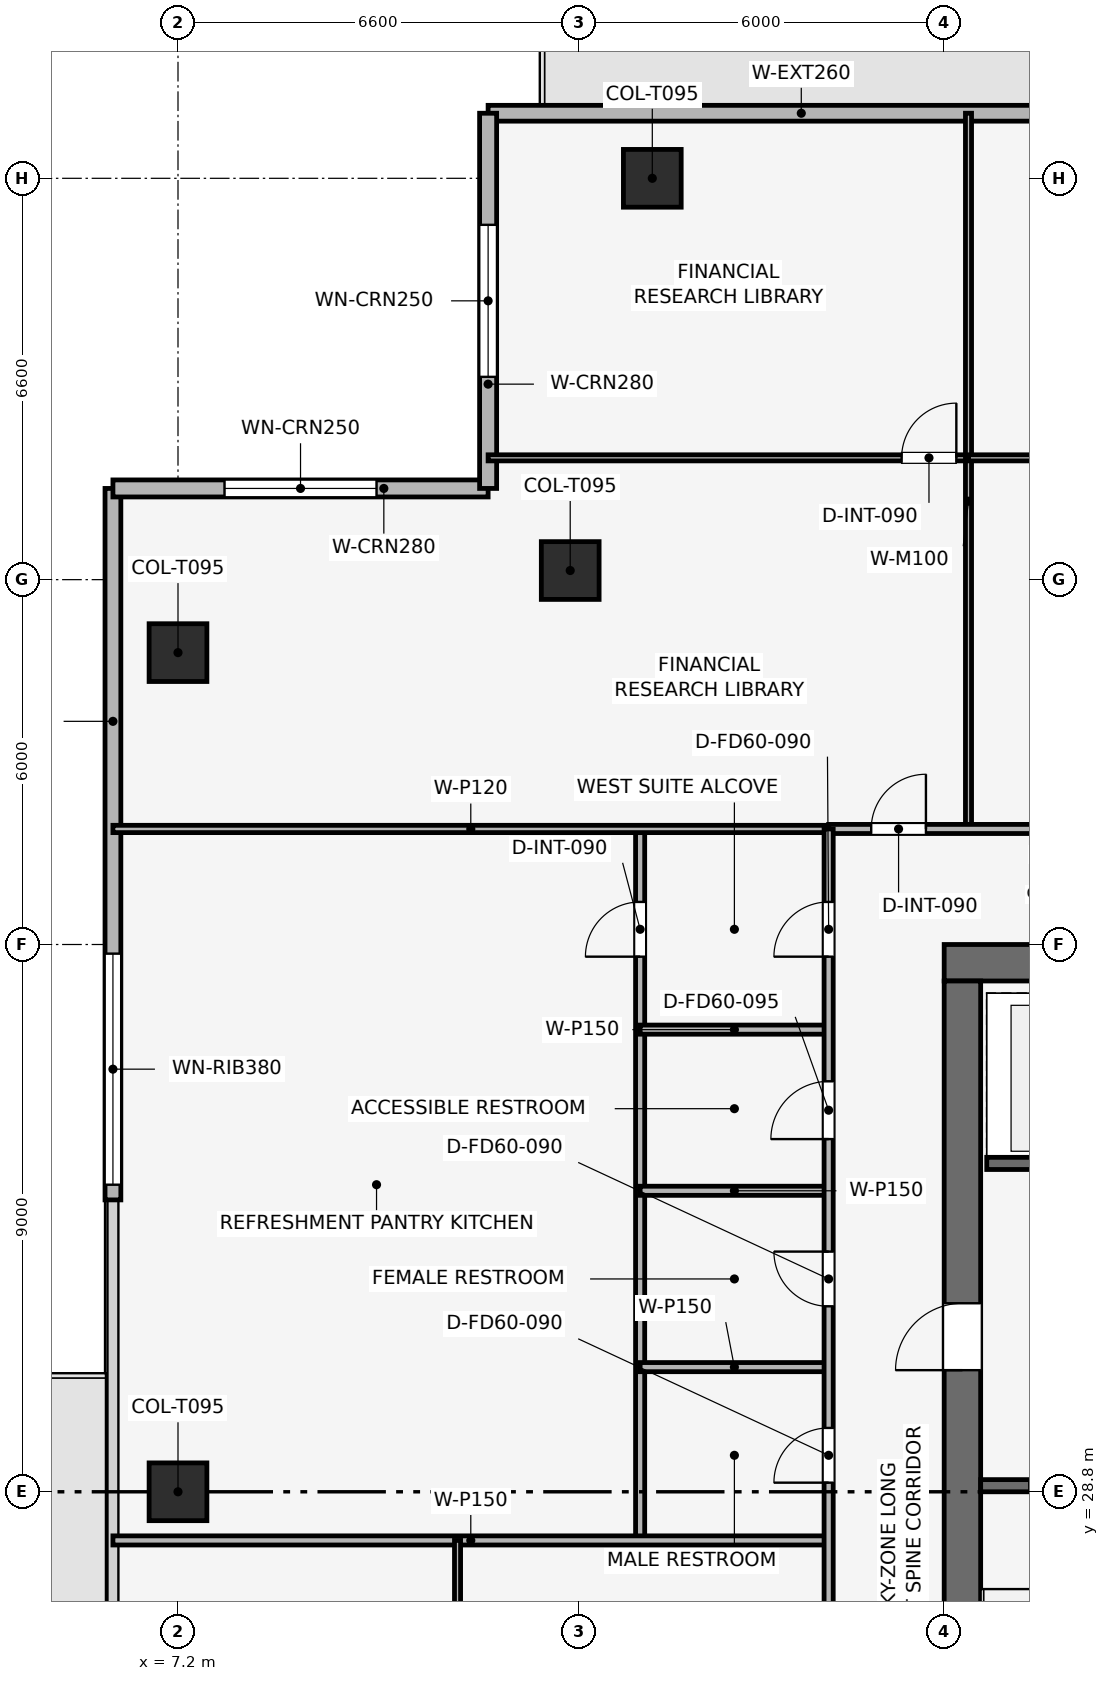
"""IFC4 building model, lengths in metres.
Left out: names, types, materials, properties, quantities, classifications, styles, units other than length and angle.
Written with IfcOpenShell. Run it as: python <this file> out.ifc"""

import sys

from ifc_helpers import new_model, si_unit, direction, frame, frame_2d, origin, origin_2d, place, context, subcontext, project, spatial, rectangle, extrude, element, fill, save


model = new_model("IFC4")
c1 = context("Model", 3, precision=1e-05, world=origin(), true_north=direction((0.0, 1.0)))
c2 = subcontext(c1, "Body", "Model", "MODEL_VIEW")
j1 = project(units=[si_unit("LENGTHUNIT", "METRE"), si_unit("PLANEANGLEUNIT", "RADIAN")], contexts=[c1])
p1 = place(None, origin())
s1 = spatial("IfcSite", under=j1, at=p1, CompositionType="ELEMENT")
p2 = place(p1, origin())
s2 = spatial("IfcBuilding", under=s1, at=p2, CompositionType="ELEMENT")
p3 = place(p2, frame((0.0, 0.0, 299.25)))
s3 = spatial("IfcBuildingStorey", under=s2, at=p3, CompositionType="ELEMENT", Elevation=299.25)
p4 = place(p3, frame((19.8, 37.5, 0.0), z_axis=(0.0, 0.0, 1.0), x_axis=(1.0, 0.0, 0.0)))
e1 = element("IfcWall", 1, at=p4, inside=s3, PredefinedType="SHEAR", context=c2, shape_type="SweptSolid", body=[
    extrude(rectangle(XDim=18.0, YDim=0.6, at=frame_2d((9.0, 0.0))), origin(), (0.0, 0.0, 1.0), 3.75),
])
p5 = place(p4, frame((7.05, 0.0, 0.0)))
e2 = element("IfcOpeningElement", 2, at=p5, cuts=e1, PredefinedType="OPENING", context=c2, shape_type="SweptSolid", body=[
    extrude(rectangle(XDim=1.1, YDim=2.15, at=frame_2d((0.55, 1.075))), frame((0.0, 0.31, 0.0), z_axis=(0.0, -1.0, 0.0), x_axis=(1.0, 0.0, 0.0)), (0.0, 0.0, 1.0), 0.62),
])
p6 = place(p3, frame((20.1, 20.4, 0.0), z_axis=(0.0, 0.0, 1.0), x_axis=(0.0, 1.0, 0.0)))
e3 = element("IfcWall", 3, at=p6, inside=s3, PredefinedType="SHEAR", context=c2, shape_type="SweptSolid", body=[
    extrude(rectangle(XDim=16.8, YDim=0.6, at=frame_2d((8.4, 0.0))), origin(), (0.0, 0.0, 1.0), 3.75),
])
p7 = place(p6, frame((10.4, 0.0, 0.0)))
e4 = element("IfcOpeningElement", 4, at=p7, cuts=e3, PredefinedType="OPENING", context=c2, shape_type="SweptSolid", body=[
    extrude(rectangle(XDim=1.1, YDim=2.15, at=frame_2d((0.55, 1.075))), frame((0.0, 0.31, 0.0), z_axis=(0.0, -1.0, 0.0), x_axis=(1.0, 0.0, 0.0)), (0.0, 0.0, 1.0), 0.62),
])
for number, where, z_axis, x_axis in (
    (5, (15.0, 50.4, 0.003), (0.0, 0.0, 1.0), (1.0, 0.0, 0.0)),
    (6, (7.2, 42.6, 0.003), (0.0, 0.0, 1.0), (1.0, 0.0, 0.0)),
    (7, (7.2, 28.8, 0.003), (0.0, 0.0, 1.0), (1.0, 0.0, 0.0)),
    (8, (13.65, 43.95, 0.003), (0.0, 0.0, 1.0), (1.0, 0.0, 0.0)),
):
    element("IfcColumn", number, at=place(p3, frame(where, z_axis=z_axis, x_axis=x_axis)), inside=s3, PredefinedType="COLUMN", context=c2, shape_type="SweptSolid", body=[
        extrude(rectangle(XDim=0.95, YDim=0.95, at=origin_2d()), origin(), (0.0, 0.0, 1.0), 3.504),
    ])
p8 = place(p3, frame((12.3, 51.47, 0.0), z_axis=(0.0, 0.0, 1.0), x_axis=(1.0, 0.0, 0.0)))
e9 = element("IfcWall", 9, at=p8, inside=s3, PredefinedType="SOLIDWALL", context=c2, shape_type="SweptSolid", body=[
    extrude(rectangle(XDim=11.7, YDim=0.26, at=frame_2d((5.85, 0.0))), origin(), (0.0, 0.0, 1.0), 3.51),
])
p9 = place(p8, frame((10.45, 0.0, 0.0)))
e10 = element("IfcOpeningElement", 10, at=p9, cuts=e9, PredefinedType="OPENING", context=c2, shape_type="SweptSolid", body=[
    extrude(rectangle(XDim=1.0, YDim=2.2, at=frame_2d((0.5, 1.1))), frame((0.0, 0.14, 0.0), z_axis=(0.0, -1.0, 0.0), x_axis=(1.0, 0.0, 0.0)), (0.0, 0.0, 1.0), 0.28),
])
p10 = place(p3, frame((6.13, 33.6, 0.0), z_axis=(0.0, 0.0, 1.0), x_axis=(0.0, 1.0, 0.0)))
e11 = element("IfcWall", 11, at=p10, inside=s3, PredefinedType="SOLIDWALL", context=c2, shape_type="SweptSolid", body=[
    extrude(rectangle(XDim=11.7, YDim=0.26, at=frame_2d((5.85, 0.0))), origin(), (0.0, 0.0, 1.0), 3.51),
])
p11 = place(p10, frame((0.25, 0.0, 0.9)))
e12 = element("IfcOpeningElement", 12, at=p11, cuts=e11, PredefinedType="OPENING", context=c2, shape_type="SweptSolid", body=[
    extrude(rectangle(XDim=3.8, YDim=1.9, at=frame_2d((1.9, 0.95))), frame((0.0, 0.14, 0.0), z_axis=(0.0, -1.0, 0.0), x_axis=(1.0, 0.0, 0.0)), (0.0, 0.0, 1.0), 0.28),
])
p12 = place(p3, frame((6.13, 45.3, 0.0), z_axis=(0.0, 0.0, 1.0), x_axis=(1.0, 0.0, 0.0)))
e13 = element("IfcWall", 13, at=p12, inside=s3, PredefinedType="SOLIDWALL", context=c2, shape_type="SweptSolid", body=[
    extrude(rectangle(XDim=6.17, YDim=0.28, at=frame_2d((3.085, 0.0))), origin(), (0.0, 0.0, 1.0), 3.51),
])
p13 = place(p12, frame((1.835, 0.0, 0.9)))
e14 = element("IfcOpeningElement", 14, at=p13, cuts=e13, PredefinedType="OPENING", context=c2, shape_type="SweptSolid", body=[
    extrude(rectangle(XDim=2.5, YDim=1.9, at=frame_2d((1.25, 0.95))), frame((0.0, 0.15, 0.0), z_axis=(0.0, -1.0, 0.0), x_axis=(1.0, 0.0, 0.0)), (0.0, 0.0, 1.0), 0.3),
])
p14 = place(p3, frame((12.3, 45.3, 0.0), z_axis=(0.0, 0.0, 1.0), x_axis=(0.0, 1.0, 0.0)))
e15 = element("IfcWall", 15, at=p14, inside=s3, PredefinedType="SOLIDWALL", context=c2, shape_type="SweptSolid", body=[
    extrude(rectangle(XDim=6.17, YDim=0.28, at=frame_2d((3.085, 0.0))), origin(), (0.0, 0.0, 1.0), 3.51),
])
p15 = place(p14, frame((1.835, 0.0, 0.9)))
e16 = element("IfcOpeningElement", 16, at=p15, cuts=e15, PredefinedType="OPENING", context=c2, shape_type="SweptSolid", body=[
    extrude(rectangle(XDim=2.5, YDim=1.9, at=frame_2d((1.25, 0.95))), frame((0.0, 0.15, 0.0), z_axis=(0.0, -1.0, 0.0), x_axis=(1.0, 0.0, 0.0)), (0.0, 0.0, 1.0), 0.3),
])
p16 = place(p3, frame((20.4, 28.9, 0.0), z_axis=(0.0, 0.0, 1.0), x_axis=(1.0, 0.0, 0.0)))
e17 = element("IfcWall", 17, at=p16, inside=s3, PredefinedType="SHEAR", context=c2, shape_type="SweptSolid", body=[
    extrude(rectangle(XDim=3.15, YDim=0.2, at=frame_2d((1.575, 0.0))), origin(), (0.0, 0.0, 1.0), 3.51),
])
p17 = place(p16, frame((0.8, 0.0, 0.0)))
e18 = element("IfcOpeningElement", 18, at=p17, cuts=e17, PredefinedType="OPENING", context=c2, shape_type="SweptSolid", body=[
    extrude(rectangle(XDim=1.0, YDim=2.1, at=frame_2d((0.5, 1.05))), frame((0.0, 0.11, 0.0), z_axis=(0.0, -1.0, 0.0), x_axis=(1.0, 0.0, 0.0)), (0.0, 0.0, 1.0), 0.22),
])
p18 = place(p3, frame((20.5, 34.2, 0.0), z_axis=(0.0, 0.0, 1.0), x_axis=(1.0, 0.0, 0.0)))
e19 = element("IfcWall", 19, at=p18, inside=s3, PredefinedType="SHEAR", context=c2, shape_type="SweptSolid", body=[
    extrude(rectangle(XDim=3.05, YDim=0.2, at=frame_2d((1.525, 0.0))), origin(), (0.0, 0.0, 1.0), 3.51),
])
p19 = place(p18, frame((0.75, 0.0, 0.0)))
e20 = element("IfcOpeningElement", 20, at=p19, cuts=e19, PredefinedType="OPENING", context=c2, shape_type="SweptSolid", body=[
    extrude(rectangle(XDim=1.1, YDim=2.15, at=frame_2d((0.55, 1.075))), frame((0.0, 0.11, 0.0), z_axis=(0.0, -1.0, 0.0), x_axis=(1.0, 0.0, 0.0)), (0.0, 0.0, 1.0), 0.22),
])
p20 = place(p3, frame((12.3, 45.803, 0.0), z_axis=(0.0, 0.0, 1.0), x_axis=(1.0, 0.0, 0.0)))
e21 = element("IfcWall", 21, at=p20, inside=s3, PredefinedType="MOVABLE", context=c2, shape_type="SweptSolid", body=[
    extrude(rectangle(XDim=7.9, YDim=0.1, at=frame_2d((3.95, 0.0))), origin(), (0.0, 0.0, 1.0), 3.095),
])
p21 = place(p20, frame((6.8, 0.0, 0.0)))
e22 = element("IfcOpeningElement", 22, at=p21, cuts=e21, PredefinedType="OPENING", context=c2, shape_type="SweptSolid", body=[
    extrude(rectangle(XDim=0.9, YDim=2.1, at=frame_2d((0.45, 1.05))), frame((0.0, 0.06, 0.0), z_axis=(0.0, -1.0, 0.0), x_axis=(1.0, 0.0, 0.0)), (0.0, 0.0, 1.0), 0.12),
])
p22 = place(p3, frame((20.2, 39.7, 0.0), z_axis=(0.0, 0.0, 1.0), x_axis=(0.0, 1.0, 0.0)))
e23 = element("IfcWall", 23, at=p22, inside=s3, PredefinedType="MOVABLE", context=c2, shape_type="SweptSolid", body=[
    extrude(rectangle(XDim=11.77, YDim=0.1, at=frame_2d((5.885, 0.0))), origin(), (0.0, 0.0, 1.0), 3.095),
])
p23 = place(p3, frame((20.2, 45.803, 0.0), z_axis=(0.0, 0.0, 1.0), x_axis=(1.0, 0.0, 0.0)))
e24 = element("IfcWall", 24, at=p23, inside=s3, PredefinedType="MOVABLE", context=c2, shape_type="SweptSolid", body=[
    extrude(rectangle(XDim=8.405, YDim=0.1, at=frame_2d((4.203, 0.0))), origin(), (0.0, 0.0, 1.0), 3.095),
])
p24 = place(p23, frame((1.384, 0.0, 0.0)))
e25 = element("IfcOpeningElement", 25, at=p24, cuts=e24, PredefinedType="OPENING", context=c2, shape_type="SweptSolid", body=[
    extrude(rectangle(XDim=0.9, YDim=2.1, at=frame_2d((0.45, 1.05))), frame((0.0, 0.06, 0.0), z_axis=(0.0, -1.0, 0.0), x_axis=(1.0, 0.0, 0.0)), (0.0, 0.0, 1.0), 0.12),
])
p25 = place(p3, frame((14.8, 28.0, 0.0), z_axis=(0.0, 0.0, 1.0), x_axis=(0.0, 1.0, 0.0)))
e26 = element("IfcWall", 26, at=p25, inside=s3, PredefinedType="PARTITIONING", context=c2, shape_type="SweptSolid", body=[
    extrude(rectangle(XDim=11.7, YDim=0.15, at=frame_2d((5.85, 0.0))), origin(), (0.0, 0.0, 1.0), 3.095),
])
p26 = place(p25, frame((9.6, 0.0, 0.0)))
e27 = element("IfcOpeningElement", 27, at=p26, cuts=e26, PredefinedType="OPENING", context=c2, shape_type="SweptSolid", body=[
    extrude(rectangle(XDim=0.9, YDim=2.1, at=frame_2d((0.45, 1.05))), frame((0.0, 0.085, 0.0), z_axis=(0.0, -1.0, 0.0), x_axis=(1.0, 0.0, 0.0)), (0.0, 0.0, 1.0), 0.17),
])
p27 = place(p3, frame((6.13, 28.0, 0.0), z_axis=(0.0, 0.0, 1.0), x_axis=(1.0, 0.0, 0.0)))
e28 = element("IfcWall", 28, at=p27, inside=s3, PredefinedType="PARTITIONING", context=c2, shape_type="SweptSolid", body=[
    extrude(rectangle(XDim=11.77, YDim=0.15, at=frame_2d((5.885, 0.0))), origin(), (0.0, 0.0, 1.0), 3.135),
])
for number, where, z_axis, x_axis in (
    (29, (14.8, 36.4, 0.0), (0.0, 0.0, 1.0), (1.0, 0.0, 0.0)),
    (30, (14.8, 30.85, 0.0), (0.0, 0.0, 1.0), (1.0, 0.0, 0.0)),
    (31, (14.8, 33.75, 0.0), (0.0, 0.0, 1.0), (1.0, 0.0, 0.0)),
):
    element("IfcWall", number, at=place(p3, frame(where, z_axis=z_axis, x_axis=x_axis)), inside=s3, PredefinedType="PARTITIONING", context=c2, shape_type="SweptSolid", body=[
        extrude(rectangle(XDim=3.1, YDim=0.15, at=frame_2d((1.55, 0.0))), origin(), (0.0, 0.0, 1.0), 3.135),
    ])
p28 = place(p3, frame((11.797, 17.93, 0.0), z_axis=(0.0, 0.0, 1.0), x_axis=(0.0, 1.0, 0.0)))
e32 = element("IfcWall", 32, at=p28, inside=s3, PredefinedType="MOVABLE", context=c2, shape_type="SweptSolid", body=[
    extrude(rectangle(XDim=10.07, YDim=0.1, at=frame_2d((5.035, 0.0))), origin(), (0.0, 0.0, 1.0), 3.095),
])
p29 = place(p28, frame((3.489, 0.0, 0.0)))
e33 = element("IfcOpeningElement", 33, at=p29, cuts=e32, PredefinedType="OPENING", context=c2, shape_type="SweptSolid", body=[
    extrude(rectangle(XDim=0.9, YDim=2.1, at=frame_2d((0.45, 1.05))), frame((0.0, 0.06, 0.0), z_axis=(0.0, -1.0, 0.0), x_axis=(1.0, 0.0, 0.0)), (0.0, 0.0, 1.0), 0.12),
])
p30 = place(p3, frame((6.13, 39.7, 0.0), z_axis=(0.0, 0.0, 1.0), x_axis=(1.0, 0.0, 0.0)))
e34 = element("IfcWall", 34, at=p30, inside=s3, PredefinedType="PARTITIONING", context=c2, shape_type="SweptSolid", body=[
    extrude(rectangle(XDim=11.77, YDim=0.12, at=frame_2d((5.885, 0.0))), origin(), (0.0, 0.0, 1.0), 3.095),
])
p31 = place(p3, frame((17.9, 39.7, 0.0), z_axis=(0.0, 0.0, 1.0), x_axis=(1.0, 0.0, 0.0)))
e35 = element("IfcWall", 35, at=p31, inside=s3, PredefinedType="PARTITIONING", context=c2, shape_type="SweptSolid", body=[
    extrude(rectangle(XDim=21.8, YDim=0.15, at=frame_2d((10.9, 0.0))), origin(), (0.0, 0.0, 1.0), 3.095),
])
p32 = place(p31, frame((0.7, 0.0, 0.0)))
e36 = element("IfcOpeningElement", 36, at=p32, cuts=e35, PredefinedType="OPENING", context=c2, shape_type="SweptSolid", body=[
    extrude(rectangle(XDim=0.9, YDim=2.1, at=frame_2d((0.45, 1.05))), frame((0.0, 0.085, 0.0), z_axis=(0.0, -1.0, 0.0), x_axis=(1.0, 0.0, 0.0)), (0.0, 0.0, 1.0), 0.17),
])
p33 = place(p31, frame((6.053, 0.0, 0.0)))
e37 = element("IfcOpeningElement", 37, at=p33, cuts=e35, PredefinedType="OPENING", context=c2, shape_type="SweptSolid", body=[
    extrude(rectangle(XDim=0.9, YDim=2.1, at=frame_2d((0.45, 1.05))), frame((0.0, 0.085, 0.0), z_axis=(0.0, -1.0, 0.0), x_axis=(1.0, 0.0, 0.0)), (0.0, 0.0, 1.0), 0.17),
])
p34 = place(p31, frame((15.803, 0.0, 0.0)))
e38 = element("IfcOpeningElement", 38, at=p34, cuts=e35, PredefinedType="OPENING", context=c2, shape_type="SweptSolid", body=[
    extrude(rectangle(XDim=0.9, YDim=2.1, at=frame_2d((0.45, 1.05))), frame((0.0, 0.085, 0.0), z_axis=(0.0, -1.0, 0.0), x_axis=(1.0, 0.0, 0.0)), (0.0, 0.0, 1.0), 0.17),
])
p35 = place(p3, frame((17.9, 12.3, 0.0), z_axis=(0.0, 0.0, 1.0), x_axis=(0.0, 1.0, 0.0)))
e39 = element("IfcWall", 39, at=p35, inside=s3, PredefinedType="PARTITIONING", context=c2, shape_type="SweptSolid", body=[
    extrude(rectangle(XDim=27.4, YDim=0.15, at=frame_2d((13.7, 0.0))), origin(), (0.0, 0.0, 1.0), 3.095),
])
p36 = place(p35, frame((2.365, 0.0, 0.0)))
e40 = element("IfcOpeningElement", 40, at=p36, cuts=e39, PredefinedType="OPENING", context=c2, shape_type="SweptSolid", body=[
    extrude(rectangle(XDim=0.9, YDim=2.1, at=frame_2d((0.45, 1.05))), frame((0.0, 0.085, 0.0), z_axis=(0.0, -1.0, 0.0), x_axis=(1.0, 0.0, 0.0)), (0.0, 0.0, 1.0), 0.17),
])
p37 = place(p35, frame((10.215, 0.0, 0.0)))
e41 = element("IfcOpeningElement", 41, at=p37, cuts=e39, PredefinedType="OPENING", context=c2, shape_type="SweptSolid", body=[
    extrude(rectangle(XDim=0.9, YDim=2.1, at=frame_2d((0.45, 1.05))), frame((0.0, 0.085, 0.0), z_axis=(0.0, -1.0, 0.0), x_axis=(1.0, 0.0, 0.0)), (0.0, 0.0, 1.0), 0.17),
])
p38 = place(p35, frame((16.65, 0.0, 0.0)))
e42 = element("IfcOpeningElement", 42, at=p38, cuts=e39, PredefinedType="OPENING", context=c2, shape_type="SweptSolid", body=[
    extrude(rectangle(XDim=0.9, YDim=2.1, at=frame_2d((0.45, 1.05))), frame((0.0, 0.085, 0.0), z_axis=(0.0, -1.0, 0.0), x_axis=(1.0, 0.0, 0.0)), (0.0, 0.0, 1.0), 0.17),
])
p39 = place(p35, frame((19.55, 0.0, 0.0)))
e43 = element("IfcOpeningElement", 43, at=p39, cuts=e39, PredefinedType="OPENING", context=c2, shape_type="SweptSolid", body=[
    extrude(rectangle(XDim=0.9, YDim=2.1, at=frame_2d((0.45, 1.05))), frame((0.0, 0.085, 0.0), z_axis=(0.0, -1.0, 0.0), x_axis=(1.0, 0.0, 0.0)), (0.0, 0.0, 1.0), 0.17),
])
p40 = place(p35, frame((22.3, 0.0, 0.0)))
e44 = element("IfcOpeningElement", 44, at=p40, cuts=e39, PredefinedType="OPENING", context=c2, shape_type="SweptSolid", body=[
    extrude(rectangle(XDim=0.95, YDim=2.1, at=frame_2d((0.475, 1.05))), frame((0.0, 0.085, 0.0), z_axis=(0.0, -1.0, 0.0), x_axis=(1.0, 0.0, 0.0)), (0.0, 0.0, 1.0), 0.17),
])
p41 = place(p35, frame((25.3, 0.0, 0.0)))
e45 = element("IfcOpeningElement", 45, at=p41, cuts=e39, PredefinedType="OPENING", context=c2, shape_type="SweptSolid", body=[
    extrude(rectangle(XDim=0.9, YDim=2.1, at=frame_2d((0.45, 1.05))), frame((0.0, 0.085, 0.0), z_axis=(0.0, -1.0, 0.0), x_axis=(1.0, 0.0, 0.0)), (0.0, 0.0, 1.0), 0.17),
])
p42 = place(p11, origin())
e46 = element("IfcWindow", 46, at=p42, inside=s3, PartitioningType="SINGLE_PANEL", PredefinedType="WINDOW", context=c2, shape_type="SweptSolid", body=[
    extrude(rectangle(XDim=3.8, YDim=1.9, at=frame_2d((1.9, 0.95))), frame((0.0, 0.03, 0.0), z_axis=(0.0, -1.0, 0.0), x_axis=(1.0, 0.0, 0.0)), (0.0, 0.0, 1.0), 0.06),
])
fill(e12, e46)
p43 = place(p13, origin())
e47 = element("IfcWindow", 47, at=p43, inside=s3, PartitioningType="SINGLE_PANEL", PredefinedType="WINDOW", context=c2, shape_type="SweptSolid", body=[
    extrude(rectangle(XDim=2.5, YDim=1.9, at=frame_2d((1.25, 0.95))), frame((0.0, 0.03, 0.0), z_axis=(0.0, -1.0, 0.0), x_axis=(1.0, 0.0, 0.0)), (0.0, 0.0, 1.0), 0.06),
])
fill(e14, e47)
p44 = place(p15, origin())
e48 = element("IfcWindow", 48, at=p44, inside=s3, PartitioningType="SINGLE_PANEL", PredefinedType="WINDOW", context=c2, shape_type="SweptSolid", body=[
    extrude(rectangle(XDim=2.5, YDim=1.9, at=frame_2d((1.25, 0.95))), frame((0.0, 0.03, 0.0), z_axis=(0.0, -1.0, 0.0), x_axis=(1.0, 0.0, 0.0)), (0.0, 0.0, 1.0), 0.06),
])
fill(e16, e48)
p45 = place(p21, origin())
e49 = element("IfcDoor", 49, at=p45, inside=s3, OperationType="SINGLE_SWING_RIGHT", PredefinedType="DOOR", context=c2, shape_type="SweptSolid", body=[
    extrude(rectangle(XDim=0.9, YDim=2.1, at=frame_2d((0.45, 1.05))), frame((0.0, 0.025, 0.0), z_axis=(0.0, -1.0, 0.0), x_axis=(1.0, 0.0, 0.0)), (0.0, 0.0, 1.0), 0.05),
])
fill(e22, e49)
p46 = place(p26, origin())
e50 = element("IfcDoor", 50, at=p46, inside=s3, OperationType="SINGLE_SWING_LEFT", PredefinedType="DOOR", context=c2, shape_type="SweptSolid", body=[
    extrude(rectangle(XDim=0.9, YDim=2.1, at=frame_2d((0.45, 1.05))), frame((0.0, 0.025, 0.0), z_axis=(0.0, -1.0, 0.0), x_axis=(1.0, 0.0, 0.0)), (0.0, 0.0, 1.0), 0.05),
])
fill(e27, e50)
p47 = place(p32, origin())
e51 = element("IfcDoor", 51, at=p47, inside=s3, OperationType="SINGLE_SWING_RIGHT", PredefinedType="DOOR", context=c2, shape_type="SweptSolid", body=[
    extrude(rectangle(XDim=0.9, YDim=2.1, at=frame_2d((0.45, 1.05))), frame((0.0, 0.025, 0.0), z_axis=(0.0, -1.0, 0.0), x_axis=(1.0, 0.0, 0.0)), (0.0, 0.0, 1.0), 0.05),
])
fill(e36, e51)
p48 = place(p38, origin())
e52 = element("IfcDoor", 52, at=p48, inside=s3, OperationType="SINGLE_SWING_LEFT", PredefinedType="DOOR", context=c2, shape_type="SweptSolid", body=[
    extrude(rectangle(XDim=0.9, YDim=2.1, at=frame_2d((0.45, 1.05))), frame((0.0, 0.025, 0.0), z_axis=(0.0, -1.0, 0.0), x_axis=(1.0, 0.0, 0.0)), (0.0, 0.0, 1.0), 0.05),
])
fill(e42, e52)
p49 = place(p39, origin())
e53 = element("IfcDoor", 53, at=p49, inside=s3, OperationType="SINGLE_SWING_RIGHT", PredefinedType="DOOR", context=c2, shape_type="SweptSolid", body=[
    extrude(rectangle(XDim=0.9, YDim=2.1, at=frame_2d((0.45, 1.05))), frame((0.0, 0.025, 0.0), z_axis=(0.0, -1.0, 0.0), x_axis=(1.0, 0.0, 0.0)), (0.0, 0.0, 1.0), 0.05),
])
fill(e43, e53)
p50 = place(p40, origin())
e54 = element("IfcDoor", 54, at=p50, inside=s3, OperationType="SINGLE_SWING_LEFT", PredefinedType="DOOR", context=c2, shape_type="SweptSolid", body=[
    extrude(rectangle(XDim=0.95, YDim=2.1, at=frame_2d((0.475, 1.05))), frame((0.0, 0.025, 0.0), z_axis=(0.0, -1.0, 0.0), x_axis=(1.0, 0.0, 0.0)), (0.0, 0.0, 1.0), 0.05),
])
fill(e44, e54)
p51 = place(p41, origin())
e55 = element("IfcDoor", 55, at=p51, inside=s3, OperationType="SINGLE_SWING_LEFT", PredefinedType="DOOR", context=c2, shape_type="SweptSolid", body=[
    extrude(rectangle(XDim=0.9, YDim=2.1, at=frame_2d((0.45, 1.05))), frame((0.0, 0.025, 0.0), z_axis=(0.0, -1.0, 0.0), x_axis=(1.0, 0.0, 0.0)), (0.0, 0.0, 1.0), 0.05),
])
fill(e45, e55)
p52 = place(p7, origin())
e56 = element("IfcDoor", 56, at=p52, inside=s3, OperationType="SINGLE_SWING_LEFT", PredefinedType="DOOR", context=c2, shape_type="SweptSolid", body=[
    extrude(rectangle(XDim=1.1, YDim=2.15, at=frame_2d((0.55, 1.075))), frame((0.0, 0.025, 0.0), z_axis=(0.0, -1.0, 0.0), x_axis=(1.0, 0.0, 0.0)), (0.0, 0.0, 1.0), 0.05),
])
fill(e4, e56)
save(model, sys.argv[1])
